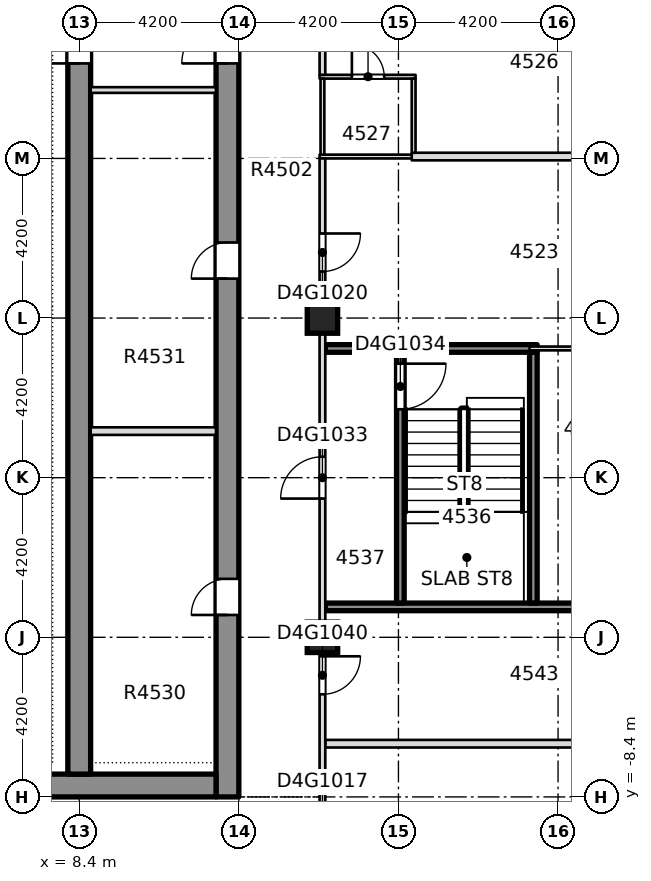
"""IFC4 building model, lengths in metres.
Left out: names, types, materials, properties, quantities, classifications, styles, units other than length and angle.
Written with IfcOpenShell. Run it as: python <this file> out.ifc"""

import sys

from ifc_helpers import new_model, si_unit, direction, frame, frame_2d, origin, origin_2d, place, context, subcontext, project, spatial, rectangle, extrude, element, fill, save


model = new_model("IFC4")
c1 = context("Model", 3, precision=1e-05, world=origin(), true_north=direction((0.0, 1.0)))
c2 = subcontext(c1, "Body", "Model", "MODEL_VIEW")
j1 = project(units=[si_unit("LENGTHUNIT", "METRE"), si_unit("PLANEANGLEUNIT", "RADIAN")], contexts=[c1])
p1 = place(None, origin())
s1 = spatial("IfcSite", under=j1, at=p1, CompositionType="ELEMENT")
p2 = place(p1, origin())
s2 = spatial("IfcBuilding", under=s1, at=p2, CompositionType="ELEMENT")
p3 = place(p2, frame((0.0, 0.0, 175.55)))
s3 = spatial("IfcBuildingStorey", under=s2, at=p3, CompositionType="ELEMENT", Elevation=175.55)
p4 = place(p3, frame((12.3, -8.4, -0.4), z_axis=(0.0, 0.0, 1.0), x_axis=(0.0, 1.0, 0.0)))
e1 = element("IfcWall", 1, at=p4, inside=s3, PredefinedType="SHEAR", context=c2, shape_type="SweptSolid", body=[
    extrude(rectangle(XDim=30.15, YDim=0.6, at=frame_2d((15.075, 0.0))), origin(), (0.0, 0.0, 1.0), 3.45),
])
p5 = place(p4, frame((4.788, 0.0, 0.4)))
e2 = element("IfcOpeningElement", 2, at=p5, cuts=e1, PredefinedType="OPENING", context=c2, shape_type="SweptSolid", body=[
    extrude(rectangle(XDim=0.95, YDim=2.1, at=frame_2d((0.475, 1.05))), frame((0.0, 0.31, 0.0), z_axis=(0.0, -1.0, 0.0), x_axis=(1.0, 0.0, 0.0)), (0.0, 0.0, 1.0), 0.62),
])
p6 = place(p4, frame((13.638, 0.0, 0.4)))
e3 = element("IfcOpeningElement", 3, at=p6, cuts=e1, PredefinedType="OPENING", context=c2, shape_type="SweptSolid", body=[
    extrude(rectangle(XDim=0.95, YDim=2.1, at=frame_2d((0.475, 1.05))), frame((0.0, 0.31, 0.0), z_axis=(0.0, -1.0, 0.0), x_axis=(1.0, 0.0, 0.0)), (0.0, 0.0, 1.0), 0.62),
])
p7 = place(p4, frame((21.771, 0.0, 0.4)))
e4 = element("IfcOpeningElement", 4, at=p7, cuts=e1, PredefinedType="OPENING", context=c2, shape_type="SweptSolid", body=[
    extrude(rectangle(XDim=0.95, YDim=2.1, at=frame_2d((0.475, 1.05))), frame((0.0, 0.31, 0.0), z_axis=(0.0, -1.0, 0.0), x_axis=(1.0, 0.0, 0.0)), (0.0, 0.0, 1.0), 0.62),
])
p8 = place(p4, frame((24.576, 0.0, 0.4)))
e5 = element("IfcOpeningElement", 5, at=p8, cuts=e1, PredefinedType="OPENING", context=c2, shape_type="SweptSolid", body=[
    extrude(rectangle(XDim=0.95, YDim=2.1, at=frame_2d((0.475, 1.05))), frame((0.0, 0.31, 0.0), z_axis=(0.0, -1.0, 0.0), x_axis=(1.0, 0.0, 0.0)), (0.0, 0.0, 1.0), 0.62),
])
p9 = place(p4, frame((27.555, 0.0, 0.4)))
e6 = element("IfcOpeningElement", 6, at=p9, cuts=e1, PredefinedType="OPENING", context=c2, shape_type="SweptSolid", body=[
    extrude(rectangle(XDim=0.95, YDim=2.1, at=frame_2d((0.475, 1.05))), frame((0.0, 0.31, 0.0), z_axis=(0.0, -1.0, 0.0), x_axis=(1.0, 0.0, 0.0)), (0.0, 0.0, 1.0), 0.62),
])
p10 = place(p4, frame((19.3, 0.0, 0.4)))
e7 = element("IfcOpeningElement", 7, at=p10, cuts=e1, PredefinedType="OPENING", context=c2, shape_type="SweptSolid", body=[
    extrude(rectangle(XDim=1.2, YDim=2.1, at=frame_2d((0.6, 1.05))), frame((0.0, 0.31, 0.0), z_axis=(0.0, -1.0, 0.0), x_axis=(1.0, 0.0, 0.0)), (0.0, 0.0, 1.0), 0.62),
])
p11 = place(p3, frame((-12.0, -8.1, -0.4), z_axis=(0.0, 0.0, 1.0), x_axis=(1.0, 0.0, 0.0)))
e8 = element("IfcWall", 8, at=p11, inside=s3, PredefinedType="SHEAR", context=c2, shape_type="SweptSolid", body=[
    extrude(rectangle(XDim=24.0, YDim=0.6, at=frame_2d((12.0, 0.0))), origin(), (0.0, 0.0, 1.0), 3.45),
])
p12 = place(p11, frame((7.25, 0.0, 0.4)))
e9 = element("IfcOpeningElement", 9, at=p12, cuts=e8, PredefinedType="OPENING", context=c2, shape_type="SweptSolid", body=[
    extrude(rectangle(XDim=1.8, YDim=2.1, at=frame_2d((0.9, 1.05))), frame((0.0, 0.31, 0.0), z_axis=(0.0, -1.0, 0.0), x_axis=(1.0, 0.0, 0.0)), (0.0, 0.0, 1.0), 0.62),
])
p13 = place(p11, frame((14.95, 0.0, 0.4)))
e10 = element("IfcOpeningElement", 10, at=p13, cuts=e8, PredefinedType="OPENING", context=c2, shape_type="SweptSolid", body=[
    extrude(rectangle(XDim=1.8, YDim=2.1, at=frame_2d((0.9, 1.05))), frame((0.0, 0.31, 0.0), z_axis=(0.0, -1.0, 0.0), x_axis=(1.0, 0.0, 0.0)), (0.0, 0.0, 1.0), 0.62),
])
p14 = place(p3, frame((8.4, -7.8, -0.4), z_axis=(0.0, 0.0, 1.0), x_axis=(0.0, 1.0, 0.0)))
e11 = element("IfcWall", 11, at=p14, inside=s3, PredefinedType="SHEAR", context=c2, shape_type="SweptSolid", body=[
    extrude(rectangle(XDim=28.95, YDim=0.6, at=frame_2d((14.475, 0.0))), origin(), (0.0, 0.0, 1.0), 3.45),
])
p15 = place(p14, frame((18.7, 0.0, 0.4)))
e12 = element("IfcOpeningElement", 12, at=p15, cuts=e11, PredefinedType="OPENING", context=c2, shape_type="SweptSolid", body=[
    extrude(rectangle(XDim=1.2, YDim=2.1, at=frame_2d((0.6, 1.05))), frame((0.0, 0.31, 0.0), z_axis=(0.0, -1.0, 0.0), x_axis=(1.0, 0.0, 0.0)), (0.0, 0.0, 1.0), 0.62),
])
for number, where, z_axis, x_axis in (
    (13, (14.8, -4.2, -0.4), (0.0, 0.0, 1.0), (1.0, 0.0, 0.0)),
    (14, (14.8, 4.2, -0.4), (0.0, 0.0, 1.0), (1.0, 0.0, 0.0)),
):
    element("IfcColumn", number, at=place(p3, frame(where, z_axis=z_axis, x_axis=x_axis)), inside=s3, PredefinedType="COLUMN", context=c2, shape_type="SweptSolid", body=[
        extrude(rectangle(XDim=0.8, YDim=0.8, at=origin_2d()), origin(), (0.0, 0.0, 1.0), 3.45),
    ])
p16 = place(p3, frame((14.875, -7.0, 0.0), z_axis=(0.0, 0.0, 1.0), x_axis=(1.0, 0.0, 0.0)))
e15 = element("IfcWall", 15, at=p16, inside=s3, PredefinedType="PARTITIONING", context=c2, shape_type="SweptSolid", body=[
    extrude(rectangle(XDim=10.875, YDim=0.2, at=frame_2d((5.438, 0.0))), origin(), (0.0, 0.0, 1.0), 3.05),
])
p17 = place(p3, frame((14.875, -3.4, 0.0), z_axis=(0.0, 0.0, 1.0), x_axis=(1.0, 0.0, 0.0)))
e16 = element("IfcWall", 16, at=p17, inside=s3, PredefinedType="SOLIDWALL", context=c2, shape_type="SweptSolid", body=[
    extrude(rectangle(XDim=7.525, YDim=0.2, at=frame_2d((3.762, 0.0))), origin(), (0.0, 0.0, 1.0), 3.05),
])
p18 = place(p3, frame((14.875, 3.4, 0.0), z_axis=(0.0, 0.0, 1.0), x_axis=(1.0, 0.0, 0.0)))
e17 = element("IfcWall", 17, at=p18, inside=s3, PredefinedType="SOLIDWALL", context=c2, shape_type="SweptSolid", body=[
    extrude(rectangle(XDim=5.575, YDim=0.2, at=frame_2d((2.788, 0.0))), origin(), (0.0, 0.0, 1.0), 3.05),
])
p19 = place(p3, frame((20.25, 3.4, 0.0), z_axis=(0.0, 0.0, 1.0), x_axis=(1.0, 0.0, 0.0)))
e18 = element("IfcWall", 18, at=p19, inside=s3, PredefinedType="PARTITIONING", context=c2, shape_type="SweptSolid", body=[
    extrude(rectangle(XDim=5.5, YDim=0.1, at=frame_2d((2.75, 0.0))), origin(), (0.0, 0.0, 1.0), 3.05),
])
p20 = place(p19, frame((2.425, 0.0, 0.0)))
e19 = element("IfcOpeningElement", 19, at=p20, cuts=e18, PredefinedType="OPENING", context=c2, shape_type="SweptSolid", body=[
    extrude(rectangle(XDim=0.95, YDim=2.1, at=frame_2d((0.475, 1.05))), frame((0.0, 0.06, 0.0), z_axis=(0.0, -1.0, 0.0), x_axis=(1.0, 0.0, 0.0)), (0.0, 0.0, 1.0), 0.12),
])
p21 = place(p3, frame((14.725, 8.45, 0.0), z_axis=(0.0, 0.0, 1.0), x_axis=(1.0, 0.0, 0.0)))
e20 = element("IfcWall", 20, at=p21, inside=s3, PredefinedType="PARTITIONING", context=c2, shape_type="SweptSolid", body=[
    extrude(rectangle(XDim=2.525, YDim=0.1, at=frame_2d((1.262, 0.0))), origin(), (0.0, 0.0, 1.0), 3.05),
])
p22 = place(p3, frame((17.15, 8.45, 0.0), z_axis=(0.0, 0.0, 1.0), x_axis=(1.0, 0.0, 0.0)))
e21 = element("IfcWall", 21, at=p22, inside=s3, PredefinedType="PARTITIONING", context=c2, shape_type="SweptSolid", body=[
    extrude(rectangle(XDim=8.6, YDim=0.2, at=frame_2d((4.3, 0.0))), origin(), (0.0, 0.0, 1.0), 3.05),
])
p23 = place(p3, frame((14.725, 10.55, 0.0), z_axis=(0.0, 0.0, 1.0), x_axis=(1.0, 0.0, 0.0)))
e22 = element("IfcWall", 22, at=p23, inside=s3, PredefinedType="PARTITIONING", context=c2, shape_type="SweptSolid", body=[
    extrude(rectangle(XDim=2.525, YDim=0.1, at=frame_2d((1.262, 0.0))), origin(), (0.0, 0.0, 1.0), 3.05),
])
p24 = place(p23, frame((0.85, 0.0, 0.0)))
e23 = element("IfcOpeningElement", 23, at=p24, cuts=e22, PredefinedType="OPENING", context=c2, shape_type="SweptSolid", body=[
    extrude(rectangle(XDim=0.85, YDim=2.1, at=frame_2d((0.425, 1.05))), frame((0.0, 0.06, 0.0), z_axis=(0.0, -1.0, 0.0), x_axis=(1.0, 0.0, 0.0)), (0.0, 0.0, 1.0), 0.12),
])
p25 = place(p3, frame((14.8, -10.525, 0.0), z_axis=(0.0, 0.0, 1.0), x_axis=(0.0, 1.0, 0.0)))
e24 = element("IfcWall", 24, at=p25, inside=s3, PredefinedType="PARTITIONING", context=c2, shape_type="SweptSolid", body=[
    extrude(rectangle(XDim=18.925, YDim=0.15, at=frame_2d((9.462, 0.0))), origin(), (0.0, 0.0, 1.0), 3.05),
])
p26 = place(p25, frame((0.925, 0.0, 0.0)))
e25 = element("IfcOpeningElement", 25, at=p26, cuts=e24, PredefinedType="OPENING", context=c2, shape_type="SweptSolid", body=[
    extrude(rectangle(XDim=1.0, YDim=2.1, at=frame_2d((0.5, 1.05))), frame((0.0, 0.085, 0.0), z_axis=(0.0, -1.0, 0.0), x_axis=(1.0, 0.0, 0.0)), (0.0, 0.0, 1.0), 0.17),
])
p27 = place(p25, frame((15.95, 0.0, 0.0)))
e26 = element("IfcOpeningElement", 26, at=p27, cuts=e24, PredefinedType="OPENING", context=c2, shape_type="SweptSolid", body=[
    extrude(rectangle(XDim=1.0, YDim=2.1, at=frame_2d((0.5, 1.05))), frame((0.0, 0.085, 0.0), z_axis=(0.0, -1.0, 0.0), x_axis=(1.0, 0.0, 0.0)), (0.0, 0.0, 1.0), 0.17),
])
p28 = place(p25, frame((9.975, 0.0, 0.0)))
e27 = element("IfcOpeningElement", 27, at=p28, cuts=e24, PredefinedType="OPENING", context=c2, shape_type="SweptSolid", body=[
    extrude(rectangle(XDim=1.1, YDim=2.1, at=frame_2d((0.55, 1.05))), frame((0.0, 0.085, 0.0), z_axis=(0.0, -1.0, 0.0), x_axis=(1.0, 0.0, 0.0)), (0.0, 0.0, 1.0), 0.17),
])
p29 = place(p25, frame((4.825, 0.0, 0.0)))
e28 = element("IfcOpeningElement", 28, at=p29, cuts=e24, PredefinedType="OPENING", context=c2, shape_type="SweptSolid", body=[
    extrude(rectangle(XDim=1.0, YDim=2.1, at=frame_2d((0.5, 1.05))), frame((0.0, 0.085, 0.0), z_axis=(0.0, -1.0, 0.0), x_axis=(1.0, 0.0, 0.0)), (0.0, 0.0, 1.0), 0.17),
])
p30 = place(p3, frame((14.8, 8.5, 0.0), z_axis=(0.0, 0.0, 1.0), x_axis=(0.0, 1.0, 0.0)))
e29 = element("IfcWall", 29, at=p30, inside=s3, PredefinedType="PARTITIONING", context=c2, shape_type="SweptSolid", body=[
    extrude(rectangle(XDim=2.0, YDim=0.1, at=frame_2d((1.0, 0.0))), origin(), (0.0, 0.0, 1.0), 3.05),
])
p31 = place(p3, frame((14.8, 10.6, 0.0), z_axis=(0.0, 0.0, 1.0), x_axis=(0.0, 1.0, 0.0)))
e30 = element("IfcWall", 30, at=p31, inside=s3, PredefinedType="PARTITIONING", context=c2, shape_type="SweptSolid", body=[
    extrude(rectangle(XDim=10.95, YDim=0.15, at=frame_2d((5.475, 0.0))), origin(), (0.0, 0.0, 1.0), 3.05),
])
p32 = place(p31, frame((0.875, 0.0, 0.0)))
e31 = element("IfcOpeningElement", 31, at=p32, cuts=e30, PredefinedType="OPENING", context=c2, shape_type="SweptSolid", body=[
    extrude(rectangle(XDim=0.95, YDim=2.1, at=frame_2d((0.475, 1.05))), frame((0.0, 0.085, 0.0), z_axis=(0.0, -1.0, 0.0), x_axis=(1.0, 0.0, 0.0)), (0.0, 0.0, 1.0), 0.17),
])
p33 = place(p31, frame((4.35, 0.0, 0.0)))
e32 = element("IfcOpeningElement", 32, at=p33, cuts=e30, PredefinedType="OPENING", context=c2, shape_type="SweptSolid", body=[
    extrude(rectangle(XDim=0.95, YDim=2.1, at=frame_2d((0.475, 1.05))), frame((0.0, 0.085, 0.0), z_axis=(0.0, -1.0, 0.0), x_axis=(1.0, 0.0, 0.0)), (0.0, 0.0, 1.0), 0.17),
])
p34 = place(p31, frame((8.25, 0.0, 0.0)))
e33 = element("IfcOpeningElement", 33, at=p34, cuts=e30, PredefinedType="OPENING", context=c2, shape_type="SweptSolid", body=[
    extrude(rectangle(XDim=0.95, YDim=2.1, at=frame_2d((0.475, 1.05))), frame((0.0, 0.085, 0.0), z_axis=(0.0, -1.0, 0.0), x_axis=(1.0, 0.0, 0.0)), (0.0, 0.0, 1.0), 0.17),
])
p35 = place(p3, frame((16.85, -3.3, 0.0), z_axis=(0.0, 0.0, 1.0), x_axis=(0.0, 1.0, 0.0)))
e34 = element("IfcWall", 34, at=p35, inside=s3, PredefinedType="SOLIDWALL", context=c2, shape_type="SweptSolid", body=[
    extrude(rectangle(XDim=6.6, YDim=0.2, at=frame_2d((3.3, 0.0))), origin(), (0.0, 0.0, 1.0), 3.05),
])
p36 = place(p35, frame((5.1, 0.0, 0.0)))
e35 = element("IfcOpeningElement", 35, at=p36, cuts=e34, PredefinedType="OPENING", context=c2, shape_type="SweptSolid", body=[
    extrude(rectangle(XDim=1.2, YDim=2.1, at=frame_2d((0.6, 1.05))), frame((0.0, 0.11, 0.0), z_axis=(0.0, -1.0, 0.0), x_axis=(1.0, 0.0, 0.0)), (0.0, 0.0, 1.0), 0.22),
])
p37 = place(p3, frame((17.2, 8.55, 0.0), z_axis=(0.0, 0.0, 1.0), x_axis=(0.0, 1.0, 0.0)))
e36 = element("IfcWall", 36, at=p37, inside=s3, PredefinedType="PARTITIONING", context=c2, shape_type="SweptSolid", body=[
    extrude(rectangle(XDim=1.95, YDim=0.1, at=frame_2d((0.975, 0.0))), origin(), (0.0, 0.0, 1.0), 3.05),
])
p38 = place(p3, frame((20.35, -3.3, 0.0), z_axis=(0.0, 0.0, 1.0), x_axis=(0.0, 1.0, 0.0)))
e37 = element("IfcWall", 37, at=p38, inside=s3, PredefinedType="SOLIDWALL", context=c2, shape_type="SweptSolid", body=[
    extrude(rectangle(XDim=6.6, YDim=0.2, at=frame_2d((3.3, 0.0))), origin(), (0.0, 0.0, 1.0), 3.05),
])
p39 = place(p3, frame((8.701, 1.225, 0.0), z_axis=(0.0, 0.0, 1.0), x_axis=(1.0, 0.0, 0.0)))
e38 = element("IfcWall", 38, at=p39, inside=s3, PredefinedType="PARTITIONING", context=c2, shape_type="SweptSolid", body=[
    extrude(rectangle(XDim=3.298, YDim=0.2, at=frame_2d((1.649, 0.0))), origin(), (0.0, 0.0, 1.0), 3.05),
])
p40 = place(p3, frame((8.701, 10.2, 0.0), z_axis=(0.0, 0.0, 1.0), x_axis=(1.0, 0.0, 0.0)))
e39 = element("IfcWall", 39, at=p40, inside=s3, PredefinedType="PARTITIONING", context=c2, shape_type="SweptSolid", body=[
    extrude(rectangle(XDim=3.298, YDim=0.15, at=frame_2d((1.649, 0.0))), origin(), (0.0, 0.0, 1.0), 3.05),
])
p41 = place(p27, origin())
e40 = element("IfcDoor", 40, at=p41, inside=s3, OperationType="SINGLE_SWING_LEFT", PredefinedType="DOOR", context=c2, shape_type="SweptSolid", body=[
    extrude(rectangle(XDim=1.0, YDim=2.1, at=frame_2d((0.5, 1.05))), frame((0.0, 0.025, 0.0), z_axis=(0.0, -1.0, 0.0), x_axis=(1.0, 0.0, 0.0)), (0.0, 0.0, 1.0), 0.05),
])
fill(e26, e40)
p42 = place(p24, origin())
e41 = element("IfcDoor", 41, at=p42, inside=s3, OperationType="SINGLE_SWING_RIGHT", PredefinedType="DOOR", context=c2, shape_type="SweptSolid", body=[
    extrude(rectangle(XDim=0.85, YDim=2.1, at=frame_2d((0.425, 1.05))), frame((0.0, 0.025, 0.0), z_axis=(0.0, -1.0, 0.0), x_axis=(1.0, 0.0, 0.0)), (0.0, 0.0, 1.0), 0.05),
])
fill(e23, e41)
p43 = place(p28, origin())
e42 = element("IfcDoor", 42, at=p43, inside=s3, OperationType="SINGLE_SWING_LEFT", PredefinedType="DOOR", context=c2, shape_type="SweptSolid", body=[
    extrude(rectangle(XDim=1.1, YDim=2.1, at=frame_2d((0.55, 1.05))), frame((0.0, 0.025, 0.0), z_axis=(0.0, -1.0, 0.0), x_axis=(1.0, 0.0, 0.0)), (0.0, 0.0, 1.0), 0.05),
])
fill(e27, e42)
p44 = place(p36, origin())
e43 = element("IfcDoor", 43, at=p44, inside=s3, OperationType="SINGLE_SWING_LEFT", PredefinedType="DOOR", context=c2, shape_type="SweptSolid", body=[
    extrude(rectangle(XDim=1.2, YDim=2.1, at=frame_2d((0.6, 1.05))), frame((0.0, 0.025, 0.0), z_axis=(0.0, -1.0, 0.0), x_axis=(1.0, 0.0, 0.0)), (0.0, 0.0, 1.0), 0.05),
])
fill(e35, e43)
p45 = place(p29, origin())
e44 = element("IfcDoor", 44, at=p45, inside=s3, OperationType="SINGLE_SWING_LEFT", PredefinedType="DOOR", context=c2, shape_type="SweptSolid", body=[
    extrude(rectangle(XDim=1.0, YDim=2.1, at=frame_2d((0.5, 1.05))), frame((0.0, 0.025, 0.0), z_axis=(0.0, -1.0, 0.0), x_axis=(1.0, 0.0, 0.0)), (0.0, 0.0, 1.0), 0.05),
])
fill(e28, e44)
p46 = place(p5, origin())
e45 = element("IfcDoor", 45, at=p46, inside=s3, OperationType="SINGLE_SWING_LEFT", PredefinedType="DOOR", context=c2, shape_type="SweptSolid", body=[
    extrude(rectangle(XDim=0.95, YDim=2.1, at=frame_2d((0.475, 1.05))), frame((0.0, 0.025, 0.0), z_axis=(0.0, -1.0, 0.0), x_axis=(1.0, 0.0, 0.0)), (0.0, 0.0, 1.0), 0.05),
])
fill(e2, e45)
p47 = place(p6, origin())
e46 = element("IfcDoor", 46, at=p47, inside=s3, OperationType="SINGLE_SWING_LEFT", PredefinedType="DOOR", context=c2, shape_type="SweptSolid", body=[
    extrude(rectangle(XDim=0.95, YDim=2.1, at=frame_2d((0.475, 1.05))), frame((0.0, 0.025, 0.0), z_axis=(0.0, -1.0, 0.0), x_axis=(1.0, 0.0, 0.0)), (0.0, 0.0, 1.0), 0.05),
])
fill(e3, e46)
p48 = place(p10, origin())
e47 = element("IfcDoor", 47, at=p48, inside=s3, OperationType="SINGLE_SWING_LEFT", PredefinedType="DOOR", context=c2, shape_type="SweptSolid", body=[
    extrude(rectangle(XDim=1.2, YDim=2.1, at=frame_2d((0.6, 1.05))), frame((0.0, 0.025, 0.0), z_axis=(0.0, -1.0, 0.0), x_axis=(1.0, 0.0, 0.0)), (0.0, 0.0, 1.0), 0.05),
])
fill(e7, e47)
p49 = place(p15, origin())
e48 = element("IfcDoor", 48, at=p49, inside=s3, OperationType="SINGLE_SWING_LEFT", PredefinedType="DOOR", context=c2, shape_type="SweptSolid", body=[
    extrude(rectangle(XDim=1.2, YDim=2.1, at=frame_2d((0.6, 1.05))), frame((0.0, 0.025, 0.0), z_axis=(0.0, -1.0, 0.0), x_axis=(1.0, 0.0, 0.0)), (0.0, 0.0, 1.0), 0.05),
])
fill(e12, e48)
save(model, sys.argv[1])
